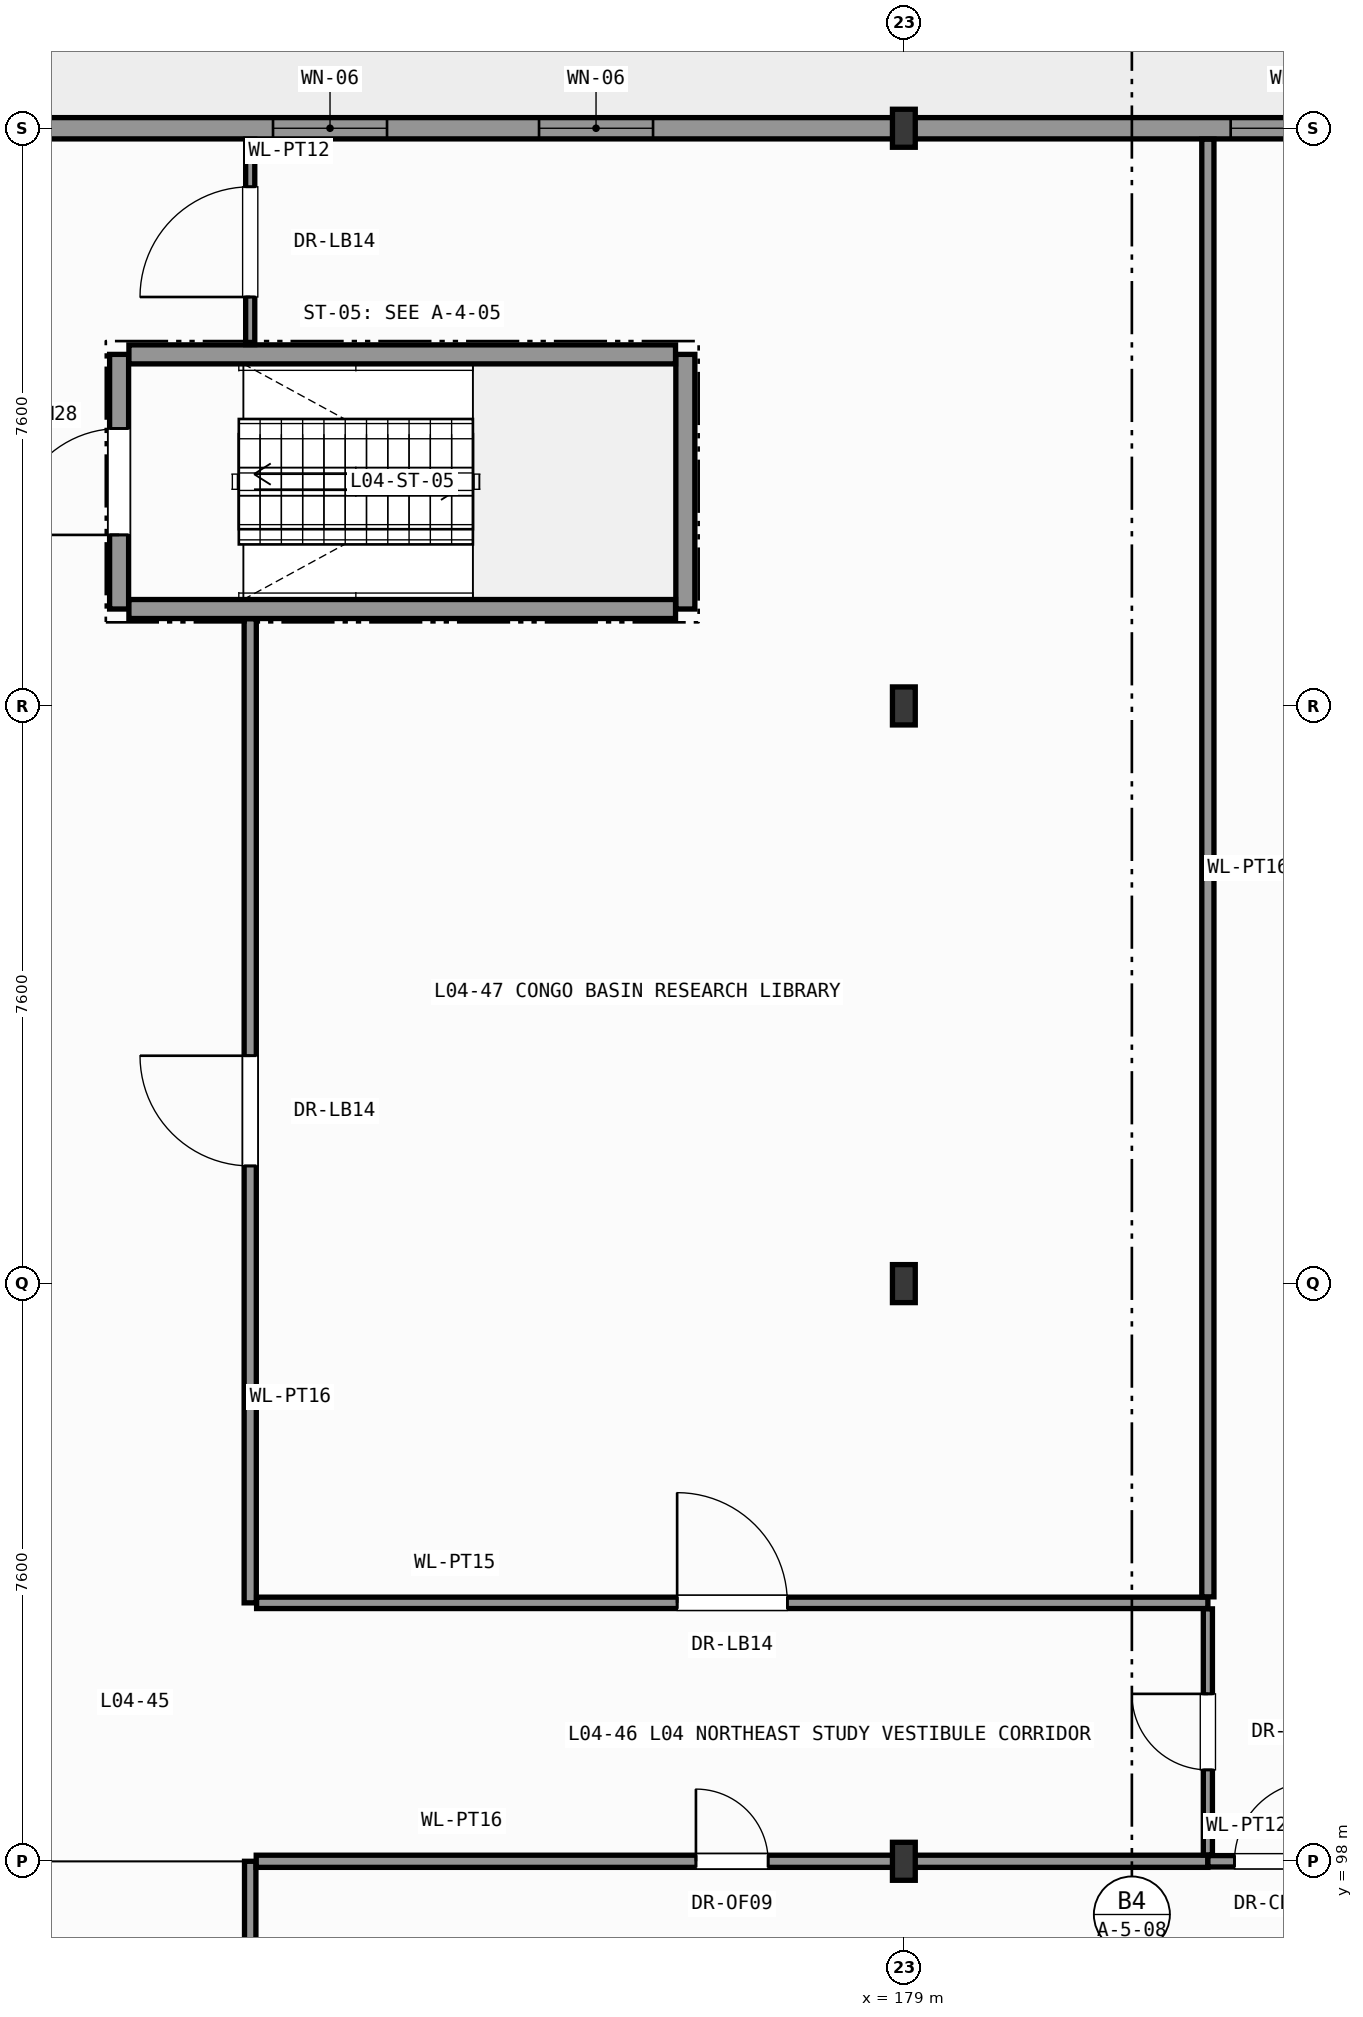
"""IFC4 building model, lengths in metres.
Left out: names, types, materials, properties, quantities, classifications, styles, units other than length and angle.
Written with IfcOpenShell. Run it as: python <this file> out.ifc"""

import sys

from ifc_helpers import new_model, si_unit, direction, frame, frame_2d, origin, origin_2d, place, context, subcontext, project, spatial, rectangle, i_section, extrude, element, fill, save


model = new_model("IFC4")
c1 = context("Model", 3, precision=1e-05, world=origin(), true_north=direction((0.0, 1.0)))
c2 = subcontext(c1, "Body", "Model", "MODEL_VIEW")
j1 = project(units=[si_unit("LENGTHUNIT", "METRE"), si_unit("PLANEANGLEUNIT", "RADIAN")], contexts=[c1])
p1 = place(None, origin())
s1 = spatial("IfcSite", under=j1, at=p1, CompositionType="ELEMENT")
p2 = place(p1, origin())
s2 = spatial("IfcBuilding", under=s1, at=p2, CompositionType="ELEMENT")
p3 = place(p2, frame((0.0, 0.0, 18.0)))
s3 = spatial("IfcBuildingStorey", under=s2, at=p3, CompositionType="ELEMENT", Elevation=18.0)
for number, where, z_axis, x_axis in (
    (1, (179.0, 98.0, 0.0), (0.0, 0.0, 1.0), (1.0, 0.0, 0.0)),
    (2, (179.0, 105.6, 0.0), (0.0, 0.0, 1.0), (1.0, 0.0, 0.0)),
    (3, (179.0, 113.2, 0.0), (0.0, 0.0, 1.0), (1.0, 0.0, 0.0)),
    (4, (179.0, 120.8, 0.0), (0.0, 0.0, 1.0), (1.0, 0.0, 0.0)),
):
    element("IfcColumn", number, at=place(p3, frame(where, z_axis=z_axis, x_axis=x_axis)), inside=s3, PredefinedType="COLUMN", context=c2, shape_type="SweptSolid", body=[
        extrude(i_section(OverallWidth=0.3, OverallDepth=0.5, WebThickness=0.014, FlangeThickness=0.028, FilletRadius=0.027, at=origin_2d()), origin(), (0.0, 0.0, 1.0), 4.2),
    ])
p4 = place(p3, frame((179.0, 120.8, 0.0), z_axis=(0.0, 0.0, 1.0), x_axis=(1.0, 0.0, 0.0)))
e5 = element("IfcWall", 5, at=p4, inside=s3, PredefinedType="SOLIDWALL", context=c2, shape_type="SweptSolid", body=[
    extrude(rectangle(XDim=12.966, YDim=0.28, at=frame_2d((6.483, 0.0))), origin(), (0.0, 0.0, 1.0), 3.385),
])
p5 = place(p4, frame((4.3, 0.0, 0.95)))
e6 = element("IfcOpeningElement", 6, at=p5, cuts=e5, PredefinedType="OPENING", context=c2, shape_type="SweptSolid", body=[
    extrude(rectangle(XDim=1.8, YDim=2.04, at=frame_2d((0.9, 1.02))), frame((0.0, 0.15, 0.0), z_axis=(0.0, -1.0, 0.0), x_axis=(1.0, 0.0, 0.0)), (0.0, 0.0, 1.0), 0.3),
])
p6 = place(p4, frame((7.7, 0.0, 0.95)))
e7 = element("IfcOpeningElement", 7, at=p6, cuts=e5, PredefinedType="OPENING", context=c2, shape_type="SweptSolid", body=[
    extrude(rectangle(XDim=1.8, YDim=2.04, at=frame_2d((0.9, 1.02))), frame((0.0, 0.15, 0.0), z_axis=(0.0, -1.0, 0.0), x_axis=(1.0, 0.0, 0.0)), (0.0, 0.0, 1.0), 0.3),
])
p7 = place(p3, frame((167.0, 120.8, 0.0), z_axis=(0.0, 0.0, 1.0), x_axis=(1.0, 0.0, 0.0)))
e8 = element("IfcWall", 8, at=p7, inside=s3, PredefinedType="SOLIDWALL", context=c2, shape_type="SweptSolid", body=[
    extrude(rectangle(XDim=12.0, YDim=0.28, at=frame_2d((6.0, 0.0))), origin(), (0.0, 0.0, 1.0), 3.385),
])
p8 = place(p7, frame((3.7, 0.0, 0.95)))
e9 = element("IfcOpeningElement", 9, at=p8, cuts=e8, PredefinedType="OPENING", context=c2, shape_type="SweptSolid", body=[
    extrude(rectangle(XDim=1.5, YDim=2.04, at=frame_2d((0.75, 1.02))), frame((0.0, 0.15, 0.0), z_axis=(0.0, -1.0, 0.0), x_axis=(1.0, 0.0, 0.0)), (0.0, 0.0, 1.0), 0.3),
])
p9 = place(p7, frame((7.2, 0.0, 0.95)))
e10 = element("IfcOpeningElement", 10, at=p9, cuts=e8, PredefinedType="OPENING", context=c2, shape_type="SweptSolid", body=[
    extrude(rectangle(XDim=1.5, YDim=2.04, at=frame_2d((0.75, 1.02))), frame((0.0, 0.15, 0.0), z_axis=(0.0, -1.0, 0.0), x_axis=(1.0, 0.0, 0.0)), (0.0, 0.0, 1.0), 0.3),
])
p10 = place(p3, frame((168.675, 114.475, 0.0), z_axis=(0.0, 0.0, 1.0), x_axis=(0.0, 1.0, 0.0)))
e11 = element("IfcWall", 11, at=p10, inside=s3, PredefinedType="SHEAR", context=c2, shape_type="SweptSolid", body=[
    extrude(rectangle(XDim=3.35, YDim=0.25, at=frame_2d((1.675, 0.0))), origin(), (0.0, 0.0, 1.0), 3.98),
])
p11 = place(p10, frame((0.975, 0.0, 0.0)))
e12 = element("IfcOpeningElement", 12, at=p11, cuts=e11, PredefinedType="OPENING", context=c2, shape_type="SweptSolid", body=[
    extrude(rectangle(XDim=1.4, YDim=2.2, at=frame_2d((0.7, 1.1))), frame((0.0, 0.135, 0.0), z_axis=(0.0, -1.0, 0.0), x_axis=(1.0, 0.0, 0.0)), (0.0, 0.0, 1.0), 0.27),
])
p12 = place(p3, frame((176.125, 114.475, 0.0), z_axis=(0.0, 0.0, 1.0), x_axis=(0.0, 1.0, 0.0)))
e13 = element("IfcWall", 13, at=p12, inside=s3, PredefinedType="SHEAR", context=c2, shape_type="SweptSolid", body=[
    extrude(rectangle(XDim=3.35, YDim=0.25, at=frame_2d((1.675, 0.0))), origin(), (0.0, 0.0, 1.0), 3.98),
])
for number, where, z_axis, x_axis in (
    (14, (168.804, 114.475, 0.0), (0.0, 0.0, 1.0), (1.0, 0.0, 0.0)),
    (15, (168.804, 117.825, 0.0), (0.0, 0.0, 1.0), (1.0, 0.0, 0.0)),
):
    element("IfcWall", number, at=place(p3, frame(where, z_axis=z_axis, x_axis=x_axis)), inside=s3, PredefinedType="SHEAR", context=c2, shape_type="SweptSolid", body=[
        extrude(rectangle(XDim=7.192, YDim=0.25, at=frame_2d((3.596, 0.0))), origin(), (0.0, 0.0, 1.0), 3.98),
    ])
p13 = place(p3, frame((170.4, 86.884, 0.0), z_axis=(0.0, 0.0, 1.0), x_axis=(0.0, 1.0, 0.0)))
e16 = element("IfcWall", 16, at=p13, inside=s3, PredefinedType="PARTITIONING", context=c2, shape_type="SweptSolid", body=[
    extrude(rectangle(XDim=11.116, YDim=0.15, at=frame_2d((5.558, 0.0))), origin(), (0.0, 0.0, 1.0), 3.98),
])
p14 = place(p13, frame((5.033, 0.0, 0.0)))
e17 = element("IfcOpeningElement", 17, at=p14, cuts=e16, PredefinedType="OPENING", context=c2, shape_type="SweptSolid", body=[
    extrude(rectangle(XDim=1.05, YDim=2.2, at=frame_2d((0.525, 1.1))), frame((0.0, 0.085, 0.0), z_axis=(0.0, -1.0, 0.0), x_axis=(1.0, 0.0, 0.0)), (0.0, 0.0, 1.0), 0.17),
])
p15 = place(p3, frame((170.479, 98.0, 0.0), z_axis=(0.0, 0.0, 1.0), x_axis=(1.0, 0.0, 0.0)))
e18 = element("IfcWall", 18, at=p15, inside=s3, PredefinedType="PARTITIONING", context=c2, shape_type="SweptSolid", body=[
    extrude(rectangle(XDim=12.521, YDim=0.16, at=frame_2d((6.26, 0.0))), origin(), (0.0, 0.0, 1.0), 3.385),
])
p16 = place(p15, frame((5.785, 0.0, 0.0)))
e19 = element("IfcOpeningElement", 19, at=p16, cuts=e18, PredefinedType="OPENING", context=c2, shape_type="SweptSolid", body=[
    extrude(rectangle(XDim=0.95, YDim=2.1, at=frame_2d((0.475, 1.05))), frame((0.0, 0.09, 0.0), z_axis=(0.0, -1.0, 0.0), x_axis=(1.0, 0.0, 0.0)), (0.0, 0.0, 1.0), 0.18),
])
p17 = place(p3, frame((183.0, 98.0, 0.0), z_axis=(0.0, 0.0, 1.0), x_axis=(1.0, 0.0, 0.0)))
e20 = element("IfcWall", 20, at=p17, inside=s3, PredefinedType="PARTITIONING", context=c2, shape_type="SweptSolid", body=[
    extrude(rectangle(XDim=14.821, YDim=0.15, at=frame_2d((7.411, 0.0))), origin(), (0.0, 0.0, 1.0), 3.285),
])
p18 = place(p17, frame((0.35, 0.0, 0.0)))
e21 = element("IfcOpeningElement", 21, at=p18, cuts=e20, PredefinedType="OPENING", context=c2, shape_type="SweptSolid", body=[
    extrude(rectangle(XDim=1.05, YDim=2.2, at=frame_2d((0.525, 1.1))), frame((0.0, 0.085, 0.0), z_axis=(0.0, -1.0, 0.0), x_axis=(1.0, 0.0, 0.0)), (0.0, 0.0, 1.0), 0.17),
])
p19 = place(p3, frame((170.4, 117.954, 0.0), z_axis=(0.0, 0.0, 1.0), x_axis=(0.0, 1.0, 0.0)))
e22 = element("IfcWall", 22, at=p19, inside=s3, PredefinedType="PARTITIONING", context=c2, shape_type="SweptSolid", body=[
    extrude(rectangle(XDim=2.702, YDim=0.12, at=frame_2d((1.351, 0.0))), origin(), (0.0, 0.0, 1.0), 3.98),
])
p20 = place(p19, frame((0.626, 0.0, 0.0)))
e23 = element("IfcOpeningElement", 23, at=p20, cuts=e22, PredefinedType="OPENING", context=c2, shape_type="SweptSolid", body=[
    extrude(rectangle(XDim=1.45, YDim=2.35, at=frame_2d((0.725, 1.175))), frame((0.0, 0.07, 0.0), z_axis=(0.0, -1.0, 0.0), x_axis=(1.0, 0.0, 0.0)), (0.0, 0.0, 1.0), 0.14),
])
p21 = place(p3, frame((170.4, 101.4, 0.0), z_axis=(0.0, 0.0, 1.0), x_axis=(0.0, 1.0, 0.0)))
e24 = element("IfcWall", 24, at=p21, inside=s3, PredefinedType="PARTITIONING", context=c2, shape_type="SweptSolid", body=[
    extrude(rectangle(XDim=12.946, YDim=0.16, at=frame_2d((6.473, 0.0))), origin(), (0.0, 0.0, 1.0), 3.98),
])
p22 = place(p21, frame((5.748, 0.0, 0.0)))
e25 = element("IfcOpeningElement", 25, at=p22, cuts=e24, PredefinedType="OPENING", context=c2, shape_type="SweptSolid", body=[
    extrude(rectangle(XDim=1.45, YDim=2.35, at=frame_2d((0.725, 1.175))), frame((0.0, 0.09, 0.0), z_axis=(0.0, -1.0, 0.0), x_axis=(1.0, 0.0, 0.0)), (0.0, 0.0, 1.0), 0.18),
])
p23 = place(p3, frame((170.484, 101.4, 0.0), z_axis=(0.0, 0.0, 1.0), x_axis=(1.0, 0.0, 0.0)))
e26 = element("IfcWall", 26, at=p23, inside=s3, PredefinedType="PARTITIONING", context=c2, shape_type="SweptSolid", body=[
    extrude(rectangle(XDim=12.516, YDim=0.15, at=frame_2d((6.258, 0.0))), origin(), (0.0, 0.0, 1.0), 3.98),
])
p24 = place(p23, frame((5.533, 0.0, 0.0)))
e27 = element("IfcOpeningElement", 27, at=p24, cuts=e26, PredefinedType="OPENING", context=c2, shape_type="SweptSolid", body=[
    extrude(rectangle(XDim=1.45, YDim=2.35, at=frame_2d((0.725, 1.175))), frame((0.0, 0.085, 0.0), z_axis=(0.0, -1.0, 0.0), x_axis=(1.0, 0.0, 0.0)), (0.0, 0.0, 1.0), 0.17),
])
p25 = place(p3, frame((183.0, 98.084, 0.0), z_axis=(0.0, 0.0, 1.0), x_axis=(0.0, 1.0, 0.0)))
e28 = element("IfcWall", 28, at=p25, inside=s3, PredefinedType="PARTITIONING", context=c2, shape_type="SweptSolid", body=[
    extrude(rectangle(XDim=3.237, YDim=0.12, at=frame_2d((1.619, 0.0))), origin(), (0.0, 0.0, 1.0), 3.98),
])
p26 = place(p25, frame((1.118, 0.0, 0.0)))
e29 = element("IfcOpeningElement", 29, at=p26, cuts=e28, PredefinedType="OPENING", context=c2, shape_type="SweptSolid", body=[
    extrude(rectangle(XDim=1.0, YDim=2.15, at=frame_2d((0.5, 1.075))), frame((0.0, 0.07, 0.0), z_axis=(0.0, -1.0, 0.0), x_axis=(1.0, 0.0, 0.0)), (0.0, 0.0, 1.0), 0.14),
])
p27 = place(p3, frame((183.0, 101.479, 0.0), z_axis=(0.0, 0.0, 1.0), x_axis=(0.0, 1.0, 0.0)))
e30 = element("IfcWall", 30, at=p27, inside=s3, PredefinedType="PARTITIONING", context=c2, shape_type="SweptSolid", body=[
    extrude(rectangle(XDim=19.177, YDim=0.16, at=frame_2d((9.588, 0.0))), origin(), (0.0, 0.0, 1.0), 3.98),
])
p28 = place(p5, origin())
e31 = element("IfcWindow", 31, at=p28, inside=s3, PartitioningType="SINGLE_PANEL", PredefinedType="WINDOW", context=c2, shape_type="SweptSolid", body=[
    extrude(rectangle(XDim=1.8, YDim=2.04, at=frame_2d((0.9, 1.02))), frame((0.0, 0.03, 0.0), z_axis=(0.0, -1.0, 0.0), x_axis=(1.0, 0.0, 0.0)), (0.0, 0.0, 1.0), 0.06),
])
fill(e6, e31)
p29 = place(p8, origin())
e32 = element("IfcWindow", 32, at=p29, inside=s3, PartitioningType="SINGLE_PANEL", PredefinedType="WINDOW", context=c2, shape_type="SweptSolid", body=[
    extrude(rectangle(XDim=1.5, YDim=2.04, at=frame_2d((0.75, 1.02))), frame((0.0, 0.03, 0.0), z_axis=(0.0, -1.0, 0.0), x_axis=(1.0, 0.0, 0.0)), (0.0, 0.0, 1.0), 0.06),
])
fill(e9, e32)
p30 = place(p9, origin())
e33 = element("IfcWindow", 33, at=p30, inside=s3, PartitioningType="SINGLE_PANEL", PredefinedType="WINDOW", context=c2, shape_type="SweptSolid", body=[
    extrude(rectangle(XDim=1.5, YDim=2.04, at=frame_2d((0.75, 1.02))), frame((0.0, 0.03, 0.0), z_axis=(0.0, -1.0, 0.0), x_axis=(1.0, 0.0, 0.0)), (0.0, 0.0, 1.0), 0.06),
])
fill(e10, e33)
p31 = place(p11, origin())
e34 = element("IfcDoor", 34, at=p31, inside=s3, OperationType="SINGLE_SWING_LEFT", PredefinedType="DOOR", context=c2, shape_type="SweptSolid", body=[
    extrude(rectangle(XDim=1.4, YDim=2.2, at=frame_2d((0.7, 1.1))), frame((0.0, 0.025, 0.0), z_axis=(0.0, -1.0, 0.0), x_axis=(1.0, 0.0, 0.0)), (0.0, 0.0, 1.0), 0.05),
])
fill(e12, e34)
p32 = place(p16, origin())
e35 = element("IfcDoor", 35, at=p32, inside=s3, OperationType="SINGLE_SWING_LEFT", PredefinedType="DOOR", context=c2, shape_type="SweptSolid", body=[
    extrude(rectangle(XDim=0.95, YDim=2.1, at=frame_2d((0.475, 1.05))), frame((0.0, 0.025, 0.0), z_axis=(0.0, -1.0, 0.0), x_axis=(1.0, 0.0, 0.0)), (0.0, 0.0, 1.0), 0.05),
])
fill(e19, e35)
p33 = place(p18, origin())
e36 = element("IfcDoor", 36, at=p33, inside=s3, OperationType="SINGLE_SWING_RIGHT", PredefinedType="DOOR", context=c2, shape_type="SweptSolid", body=[
    extrude(rectangle(XDim=1.05, YDim=2.2, at=frame_2d((0.525, 1.1))), frame((0.0, 0.025, 0.0), z_axis=(0.0, -1.0, 0.0), x_axis=(1.0, 0.0, 0.0)), (0.0, 0.0, 1.0), 0.05),
])
fill(e21, e36)
p34 = place(p20, origin())
e37 = element("IfcDoor", 37, at=p34, inside=s3, OperationType="SINGLE_SWING_LEFT", PredefinedType="DOOR", context=c2, shape_type="SweptSolid", body=[
    extrude(rectangle(XDim=1.45, YDim=2.35, at=frame_2d((0.725, 1.175))), frame((0.0, 0.025, 0.0), z_axis=(0.0, -1.0, 0.0), x_axis=(1.0, 0.0, 0.0)), (0.0, 0.0, 1.0), 0.05),
])
fill(e23, e37)
p35 = place(p22, origin())
e38 = element("IfcDoor", 38, at=p35, inside=s3, OperationType="SINGLE_SWING_RIGHT", PredefinedType="DOOR", context=c2, shape_type="SweptSolid", body=[
    extrude(rectangle(XDim=1.45, YDim=2.35, at=frame_2d((0.725, 1.175))), frame((0.0, 0.025, 0.0), z_axis=(0.0, -1.0, 0.0), x_axis=(1.0, 0.0, 0.0)), (0.0, 0.0, 1.0), 0.05),
])
fill(e25, e38)
p36 = place(p24, origin())
e39 = element("IfcDoor", 39, at=p36, inside=s3, OperationType="SINGLE_SWING_LEFT", PredefinedType="DOOR", context=c2, shape_type="SweptSolid", body=[
    extrude(rectangle(XDim=1.45, YDim=2.35, at=frame_2d((0.725, 1.175))), frame((0.0, 0.025, 0.0), z_axis=(0.0, -1.0, 0.0), x_axis=(1.0, 0.0, 0.0)), (0.0, 0.0, 1.0), 0.05),
])
fill(e27, e39)
p37 = place(p26, origin())
e40 = element("IfcDoor", 40, at=p37, inside=s3, OperationType="SINGLE_SWING_RIGHT", PredefinedType="DOOR", context=c2, shape_type="SweptSolid", body=[
    extrude(rectangle(XDim=1.0, YDim=2.15, at=frame_2d((0.5, 1.075))), frame((0.0, 0.025, 0.0), z_axis=(0.0, -1.0, 0.0), x_axis=(1.0, 0.0, 0.0)), (0.0, 0.0, 1.0), 0.05),
])
fill(e29, e40)
save(model, sys.argv[1])
